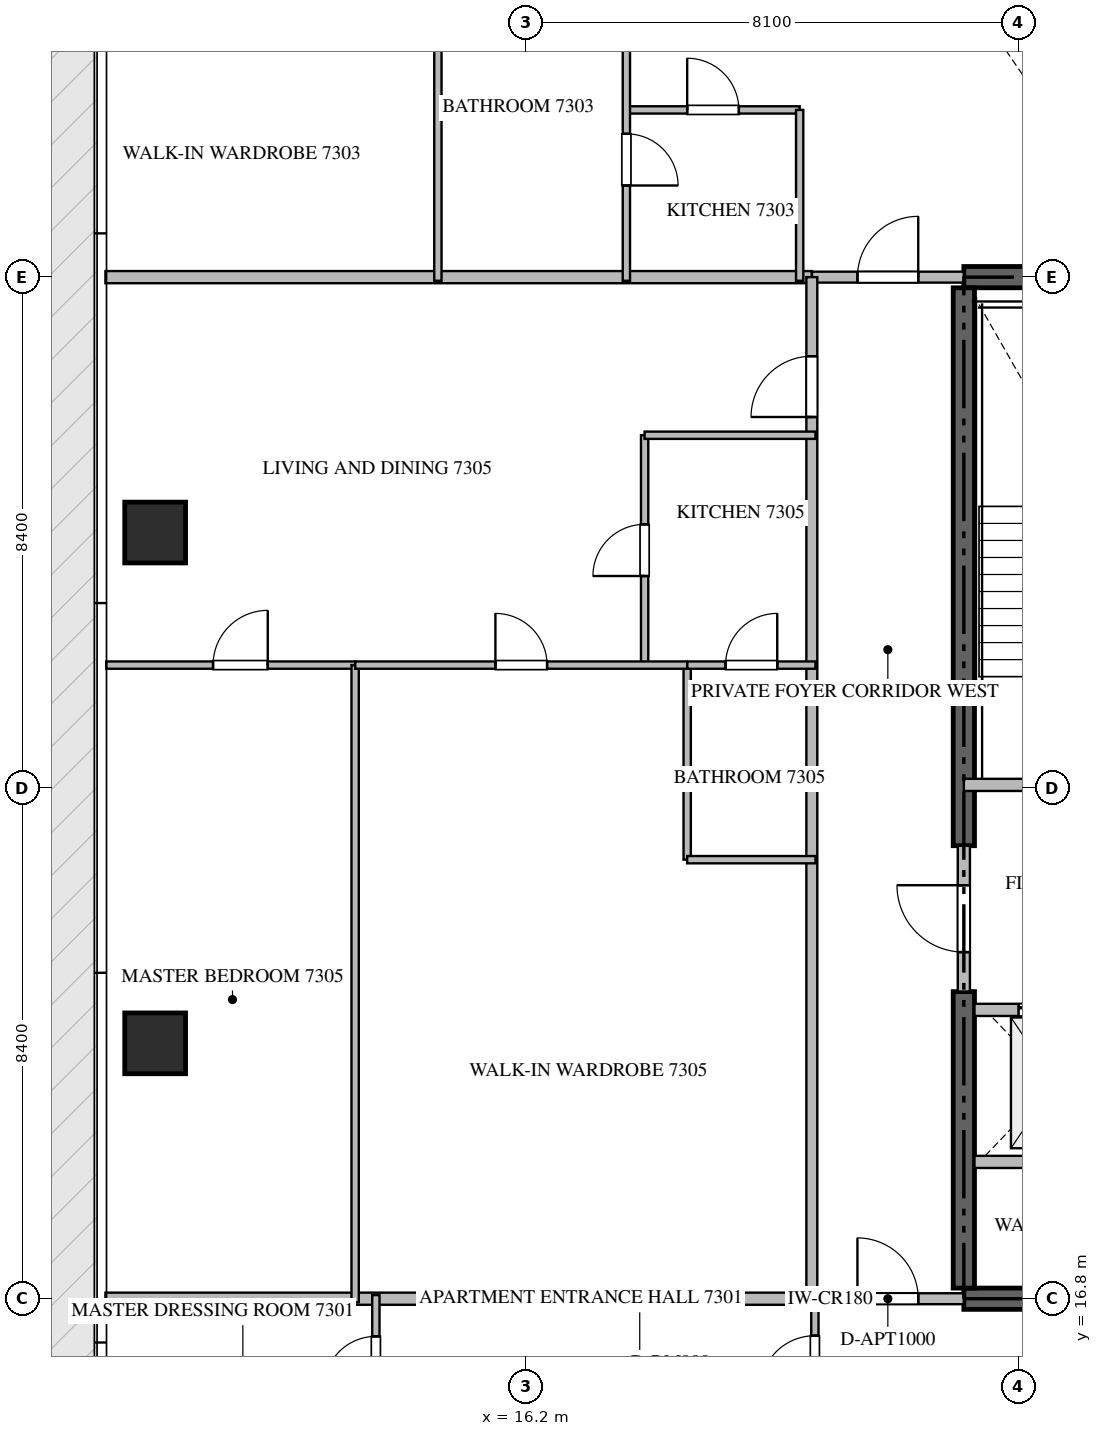
"""IFC4 building model, lengths in metres.
Left out: names, types, materials, properties, quantities, classifications, styles, units other than length and angle.
Written with IfcOpenShell. Run it as: python <this file> out.ifc"""

import sys

from ifc_helpers import new_model, si_unit, direction, frame, frame_2d, origin, origin_2d, place, context, subcontext, project, spatial, rectangle, extrude, source, transform, mapped, element, fill, save


model = new_model("IFC4")
c1 = context("Model", 3, precision=1e-05, world=origin(), true_north=direction((0.0, 1.0)))
c2 = subcontext(c1, "Body", "Model", "MODEL_VIEW")
j1 = project(units=[si_unit("LENGTHUNIT", "METRE"), si_unit("PLANEANGLEUNIT", "RADIAN")], contexts=[c1])
p1 = place(None, origin())
s1 = spatial("IfcSite", under=j1, at=p1, CompositionType="ELEMENT")
p2 = place(p1, origin())
s2 = spatial("IfcBuilding", under=s1, at=p2, CompositionType="ELEMENT")
p3 = place(p2, frame((0.0, 0.0, 293.45)))
s3 = spatial("IfcBuildingStorey", under=s2, at=p3, CompositionType="ELEMENT", Elevation=293.45)
for number, where, z_axis, x_axis in (
    (1, (23.4, 16.8, -0.26), (0.0, 0.0, 1.0), (1.0, 0.0, 0.0)),
    (2, (41.4, 33.6, -0.26), (0.0, 0.0, 1.0), (-1.0, 0.0, 0.0)),
):
    element("IfcWall", number, at=place(p3, frame(where, z_axis=z_axis, x_axis=x_axis)), inside=s3, PredefinedType="SHEAR", context=c2, shape_type="SweptSolid", body=[
        extrude(rectangle(XDim=18.0, YDim=0.35, at=frame_2d((9.0, 0.0))), origin(), (0.0, 0.0, 1.0), 4.048),
    ])
p4 = place(p3, frame((23.4, 16.975, -0.26), z_axis=(0.0, 0.0, 1.0), x_axis=(0.0, 1.0, 0.0)))
e3 = element("IfcWall", 3, at=p4, inside=s3, PredefinedType="SHEAR", context=c2, shape_type="SweptSolid", body=[
    extrude(rectangle(XDim=4.875, YDim=0.35, at=frame_2d((2.438, 0.0))), origin(), (0.0, 0.0, 1.0), 4.048),
])
p5 = place(p3, frame((23.4, 24.25, -0.26), z_axis=(0.0, 0.0, 1.0), x_axis=(0.0, 1.0, 0.0)))
e4 = element("IfcWall", 4, at=p5, inside=s3, PredefinedType="SHEAR", context=c2, shape_type="SweptSolid", body=[
    extrude(rectangle(XDim=9.175, YDim=0.35, at=frame_2d((4.587, 0.0))), origin(), (0.0, 0.0, 1.0), 4.048),
])
m1 = source(origin(), c2, "Body", "SweptSolid", [
    extrude(rectangle(XDim=1.0, YDim=1.0, at=origin_2d()), origin(), (0.0, 0.0, 1.0), 4.05),
])
for number, where, z_axis, x_axis in (
    (5, (10.1, 21.0, -0.26), (0.0, 0.0, 1.0), (1.0, 0.0, 0.0)),
    (6, (10.1, 29.4, -0.26), (0.0, 0.0, 1.0), (1.0, 0.0, 0.0)),
):
    element("IfcColumn", number, at=place(p3, frame(where, z_axis=z_axis, x_axis=x_axis)), inside=s3, PredefinedType="COLUMN", context=c2, shape_type="MappedRepresentation", body=[
        mapped(m1, transform((0.0, 0.0, 0.0), scale=1.0)),
    ])
p6 = place(p3, frame((23.4, 25.25, 0.0), z_axis=(0.0, 0.0, 1.0), x_axis=(1.0, 0.0, 0.0)))
e7 = element("IfcWall", 7, at=p6, inside=s3, PredefinedType="STANDARD", context=c2, shape_type="SweptSolid", body=[
    extrude(rectangle(XDim=4.45, YDim=0.2, at=frame_2d((2.225, 0.0))), origin(), (0.0, 0.0, 1.0), 3.79),
])
p7 = place(p6, frame((1.65, 0.0, 0.0)))
e8 = element("IfcOpeningElement", 8, at=p7, cuts=e7, PredefinedType="OPENING", context=c2, shape_type="SweptSolid", body=[
    extrude(rectangle(XDim=1.1, YDim=2.15, at=frame_2d((0.55, 1.075))), frame((0.0, 0.11, 0.0), z_axis=(0.0, -1.0, 0.0), x_axis=(1.0, 0.0, 0.0)), (0.0, 0.0, 1.0), 0.22),
])
p8 = place(p3, frame((23.575, 21.55, 0.0), z_axis=(0.0, 0.0, 1.0), x_axis=(1.0, 0.0, 0.0)))
e9 = element("IfcWall", 9, at=p8, inside=s3, PredefinedType="STANDARD", context=c2, shape_type="SweptSolid", body=[
    extrude(rectangle(XDim=2.475, YDim=0.2, at=frame_2d((1.238, 0.0))), origin(), (0.0, 0.0, 1.0), 3.79),
])
p9 = place(p8, frame((0.725, 0.0, 0.0)))
e10 = element("IfcOpeningElement", 10, at=p9, cuts=e9, PredefinedType="OPENING", context=c2, shape_type="SweptSolid", body=[
    extrude(rectangle(XDim=1.2, YDim=2.2, at=frame_2d((0.6, 1.1))), frame((0.0, 0.11, 0.0), z_axis=(0.0, -1.0, 0.0), x_axis=(1.0, 0.0, 0.0)), (0.0, 0.0, 1.0), 0.22),
])
p10 = place(p3, frame((23.575, 19.05, 0.0), z_axis=(0.0, 0.0, 1.0), x_axis=(1.0, 0.0, 0.0)))
e11 = element("IfcWall", 11, at=p10, inside=s3, PredefinedType="STANDARD", context=c2, shape_type="SweptSolid", body=[
    extrude(rectangle(XDim=2.475, YDim=0.2, at=frame_2d((1.238, 0.0))), origin(), (0.0, 0.0, 1.0), 3.79),
])
p11 = place(p3, frame((23.4, 21.852, 0.0), z_axis=(0.0, 0.0, 1.0), x_axis=(0.0, 1.0, 0.0)))
e12 = element("IfcWall", 12, at=p11, inside=s3, PredefinedType="STANDARD", context=c2, shape_type="SweptSolid", body=[
    extrude(rectangle(XDim=2.396, YDim=0.2, at=frame_2d((1.198, 0.0))), origin(), (0.0, 0.0, 1.0), 3.79),
])
p12 = place(p11, frame((0.648, 0.0, 0.0)))
e13 = element("IfcOpeningElement", 13, at=p12, cuts=e12, PredefinedType="OPENING", context=c2, shape_type="SweptSolid", body=[
    extrude(rectangle(XDim=1.1, YDim=2.15, at=frame_2d((0.55, 1.075))), frame((0.0, 0.11, 0.0), z_axis=(0.0, -1.0, 0.0), x_axis=(1.0, 0.0, 0.0)), (0.0, 0.0, 1.0), 0.22),
])
for number, where, z_axis, x_axis in (
    (14, (9.282, 16.8, 0.0), (0.0, 0.0, 1.0), (1.0, 0.0, 0.0)),
    (15, (9.282, 33.6, 0.0), (0.0, 0.0, 1.0), (1.0, 0.0, 0.0)),
):
    element("IfcWall", number, at=place(p3, frame(where, z_axis=z_axis, x_axis=x_axis)), inside=s3, PredefinedType="PARTITIONING", context=c2, shape_type="SweptSolid", body=[
        extrude(rectangle(XDim=11.618, YDim=0.2, at=frame_2d((5.809, 0.0))), origin(), (0.0, 0.0, 1.0), 3.79),
    ])
p13 = place(p3, frame((20.902, 16.8, 0.0), z_axis=(0.0, 0.0, 1.0), x_axis=(1.0, 0.0, 0.0)))
e16 = element("IfcWall", 16, at=p13, inside=s3, PredefinedType="PARTITIONING", context=c2, shape_type="SweptSolid", body=[
    extrude(rectangle(XDim=2.496, YDim=0.18, at=frame_2d((1.248, 0.0))), origin(), (0.0, 0.0, 1.0), 3.79),
])
p14 = place(p13, frame((0.748, 0.0, 0.0)))
e17 = element("IfcOpeningElement", 17, at=p14, cuts=e16, PredefinedType="OPENING", context=c2, shape_type="SweptSolid", body=[
    extrude(rectangle(XDim=1.0, YDim=2.15, at=frame_2d((0.5, 1.075))), frame((0.0, 0.1, 0.0), z_axis=(0.0, -1.0, 0.0), x_axis=(1.0, 0.0, 0.0)), (0.0, 0.0, 1.0), 0.2),
])
p15 = place(p3, frame((20.902, 33.6, 0.0), z_axis=(0.0, 0.0, 1.0), x_axis=(1.0, 0.0, 0.0)))
e18 = element("IfcWall", 18, at=p15, inside=s3, PredefinedType="PARTITIONING", context=c2, shape_type="SweptSolid", body=[
    extrude(rectangle(XDim=2.496, YDim=0.18, at=frame_2d((1.248, 0.0))), origin(), (0.0, 0.0, 1.0), 3.79),
])
p16 = place(p15, frame((0.748, 0.0, 0.0)))
e19 = element("IfcOpeningElement", 19, at=p16, cuts=e18, PredefinedType="OPENING", context=c2, shape_type="SweptSolid", body=[
    extrude(rectangle(XDim=1.0, YDim=2.15, at=frame_2d((0.5, 1.075))), frame((0.0, 0.1, 0.0), z_axis=(0.0, -1.0, 0.0), x_axis=(1.0, 0.0, 0.0)), (0.0, 0.0, 1.0), 0.2),
])
p17 = place(p3, frame((20.9, 16.8, 0.0), z_axis=(0.0, 0.0, 1.0), x_axis=(0.0, 1.0, 0.0)))
e20 = element("IfcWall", 20, at=p17, inside=s3, PredefinedType="PARTITIONING", context=c2, shape_type="SweptSolid", body=[
    extrude(rectangle(XDim=16.8, YDim=0.18, at=frame_2d((8.4, 0.0))), origin(), (0.0, 0.0, 1.0), 3.79),
])
p18 = place(p17, frame((14.5, 0.0, 0.0)))
e21 = element("IfcOpeningElement", 21, at=p18, cuts=e20, PredefinedType="OPENING", context=c2, shape_type="SweptSolid", body=[
    extrude(rectangle(XDim=1.0, YDim=2.15, at=frame_2d((0.5, 1.075))), frame((0.0, 0.1, 0.0), z_axis=(0.0, -1.0, 0.0), x_axis=(1.0, 0.0, 0.0)), (0.0, 0.0, 1.0), 0.2),
])
p19 = place(p3, frame((20.95, 14.65, 0.0), z_axis=(0.0, 0.0, 1.0), x_axis=(0.0, 1.0, 0.0)))
e22 = element("IfcWall", 22, at=p19, inside=s3, PredefinedType="PARTITIONING", context=c2, shape_type="SweptSolid", body=[
    extrude(rectangle(XDim=2.148, YDim=0.12, at=frame_2d((1.074, 0.0))), origin(), (0.0, 0.0, 1.0), 3.79),
])
p20 = place(p19, frame((0.642, 0.0, 0.0)))
e23 = element("IfcOpeningElement", 23, at=p20, cuts=e22, PredefinedType="OPENING", context=c2, shape_type="SweptSolid", body=[
    extrude(rectangle(XDim=0.9, YDim=2.1, at=frame_2d((0.45, 1.05))), frame((0.0, 0.07, 0.0), z_axis=(0.0, -1.0, 0.0), x_axis=(1.0, 0.0, 0.0)), (0.0, 0.0, 1.0), 0.14),
])
p21 = place(p3, frame((13.73, 14.652, 0.0), z_axis=(0.0, 0.0, 1.0), x_axis=(0.0, 1.0, 0.0)))
e24 = element("IfcWall", 24, at=p21, inside=s3, PredefinedType="PARTITIONING", context=c2, shape_type="SweptSolid", body=[
    extrude(rectangle(XDim=2.208, YDim=0.12, at=frame_2d((1.104, 0.0))), origin(), (0.0, 0.0, 1.0), 3.79),
])
p22 = place(p21, frame((0.679, 0.0, 0.0)))
e25 = element("IfcOpeningElement", 25, at=p22, cuts=e24, PredefinedType="OPENING", context=c2, shape_type="SweptSolid", body=[
    extrude(rectangle(XDim=0.85, YDim=2.1, at=frame_2d((0.425, 1.05))), frame((0.0, 0.07, 0.0), z_axis=(0.0, -1.0, 0.0), x_axis=(1.0, 0.0, 0.0)), (0.0, 0.0, 1.0), 0.14),
])
p23 = place(p3, frame((17.85, 36.35, 0.0), z_axis=(0.0, 0.0, 1.0), x_axis=(1.0, 0.0, 0.0)))
e26 = element("IfcWall", 26, at=p23, inside=s3, PredefinedType="PARTITIONING", context=c2, shape_type="SweptSolid", body=[
    extrude(rectangle(XDim=2.85, YDim=0.12, at=frame_2d((1.425, 0.0))), origin(), (0.0, 0.0, 1.0), 3.472),
])
p24 = place(p23, frame((1.0, 0.0, 0.0)))
e27 = element("IfcOpeningElement", 27, at=p24, cuts=e26, PredefinedType="OPENING", context=c2, shape_type="SweptSolid", body=[
    extrude(rectangle(XDim=0.85, YDim=2.1, at=frame_2d((0.425, 1.05))), frame((0.0, 0.07, 0.0), z_axis=(0.0, -1.0, 0.0), x_axis=(1.0, 0.0, 0.0)), (0.0, 0.0, 1.0), 0.14),
])
p25 = place(p3, frame((20.7, 36.35, 0.0), z_axis=(0.0, 0.0, 1.0), x_axis=(0.0, -1.0, 0.0)))
e28 = element("IfcWall", 28, at=p25, inside=s3, PredefinedType="PARTITIONING", context=c2, shape_type="SweptSolid", body=[
    extrude(rectangle(XDim=2.81, YDim=0.12, at=frame_2d((1.405, 0.0))), origin(), (0.0, 0.0, 1.0), 3.79),
])
p26 = place(p3, frame((14.75, 37.807, 0.0), z_axis=(0.0, 0.0, 1.0), x_axis=(0.0, -1.0, 0.0)))
e29 = element("IfcWall", 29, at=p26, inside=s3, PredefinedType="PARTITIONING", context=c2, shape_type="SweptSolid", body=[
    extrude(rectangle(XDim=4.267, YDim=0.12, at=frame_2d((2.133, 0.0))), origin(), (0.0, 0.0, 1.0), 3.79),
])
p27 = place(p3, frame((17.85, 37.805, 0.0), z_axis=(0.0, 0.0, 1.0), x_axis=(0.0, -1.0, 0.0)))
e30 = element("IfcWall", 30, at=p27, inside=s3, PredefinedType="PARTITIONING", context=c2, shape_type="SweptSolid", body=[
    extrude(rectangle(XDim=4.265, YDim=0.12, at=frame_2d((2.132, 0.0))), origin(), (0.0, 0.0, 1.0), 3.372),
])
p28 = place(p27, frame((1.848, 0.0, 0.0)))
e31 = element("IfcOpeningElement", 31, at=p28, cuts=e30, PredefinedType="OPENING", context=c2, shape_type="SweptSolid", body=[
    extrude(rectangle(XDim=0.85, YDim=2.1, at=frame_2d((0.425, 1.05))), frame((0.0, 0.07, 0.0), z_axis=(0.0, -1.0, 0.0), x_axis=(1.0, 0.0, 0.0)), (0.0, 0.0, 1.0), 0.14),
])
p29 = place(p3, frame((18.15, 27.22, 0.0), z_axis=(0.0, 0.0, 1.0), x_axis=(0.0, 1.0, 0.0)))
e32 = element("IfcWall", 32, at=p29, inside=s3, PredefinedType="PARTITIONING", context=c2, shape_type="SweptSolid", body=[
    extrude(rectangle(XDim=3.78, YDim=0.12, at=frame_2d((1.89, 0.0))), origin(), (0.0, 0.0, 1.0), 3.79),
])
p30 = place(p29, frame((1.465, 0.0, 0.0)))
e33 = element("IfcOpeningElement", 33, at=p30, cuts=e32, PredefinedType="OPENING", context=c2, shape_type="SweptSolid", body=[
    extrude(rectangle(XDim=0.85, YDim=2.1, at=frame_2d((0.425, 1.05))), frame((0.0, 0.07, 0.0), z_axis=(0.0, -1.0, 0.0), x_axis=(1.0, 0.0, 0.0)), (0.0, 0.0, 1.0), 0.14),
])
p31 = place(p3, frame((18.15, 31.0, 0.0), z_axis=(0.0, 0.0, 1.0), x_axis=(1.0, 0.0, 0.0)))
e34 = element("IfcWall", 34, at=p31, inside=s3, PredefinedType="PARTITIONING", context=c2, shape_type="SweptSolid", body=[
    extrude(rectangle(XDim=2.81, YDim=0.12, at=frame_2d((1.405, 0.0))), origin(), (0.0, 0.0, 1.0), 3.79),
])
p32 = place(p3, frame((9.295, 27.22, 0.0), z_axis=(0.0, 0.0, 1.0), x_axis=(1.0, 0.0, 0.0)))
e35 = element("IfcWall", 35, at=p32, inside=s3, PredefinedType="PARTITIONING", context=c2, shape_type="SweptSolid", body=[
    extrude(rectangle(XDim=4.094, YDim=0.12, at=frame_2d((2.047, 0.0))), origin(), (0.0, 0.0, 1.0), 3.79),
])
p33 = place(p32, frame((1.757, 0.0, 0.0)))
e36 = element("IfcOpeningElement", 36, at=p33, cuts=e35, PredefinedType="OPENING", context=c2, shape_type="SweptSolid", body=[
    extrude(rectangle(XDim=0.9, YDim=2.1, at=frame_2d((0.45, 1.05))), frame((0.0, 0.07, 0.0), z_axis=(0.0, -1.0, 0.0), x_axis=(1.0, 0.0, 0.0)), (0.0, 0.0, 1.0), 0.14),
])
p34 = place(p3, frame((13.389, 16.74, 0.0), z_axis=(0.0, 0.0, 1.0), x_axis=(0.0, 1.0, 0.0)))
e37 = element("IfcWall", 37, at=p34, inside=s3, PredefinedType="PARTITIONING", context=c2, shape_type="SweptSolid", body=[
    extrude(rectangle(XDim=10.48, YDim=0.12, at=frame_2d((5.24, 0.0))), origin(), (0.0, 0.0, 1.0), 3.79),
])
p35 = place(p3, frame((18.85, 24.02, 0.0), z_axis=(0.0, 0.0, 1.0), x_axis=(0.0, 1.0, 0.0)))
e38 = element("IfcWall", 38, at=p35, inside=s3, PredefinedType="PARTITIONING", context=c2, shape_type="SweptSolid", body=[
    extrude(rectangle(XDim=3.2, YDim=0.12, at=frame_2d((1.6, 0.0))), origin(), (0.0, 0.0, 1.0), 3.79),
])
p36 = place(p3, frame((18.85, 24.02, 0.0), z_axis=(0.0, 0.0, 1.0), x_axis=(1.0, 0.0, 0.0)))
e39 = element("IfcWall", 39, at=p36, inside=s3, PredefinedType="PARTITIONING", context=c2, shape_type="SweptSolid", body=[
    extrude(rectangle(XDim=2.11, YDim=0.12, at=frame_2d((1.055, 0.0))), origin(), (0.0, 0.0, 1.0), 3.79),
])
p37 = place(p3, frame((13.391, 27.22, 0.0), z_axis=(0.0, 0.0, 1.0), x_axis=(1.0, 0.0, 0.0)))
e40 = element("IfcWall", 40, at=p37, inside=s3, PredefinedType="PARTITIONING", context=c2, shape_type="SweptSolid", body=[
    extrude(rectangle(XDim=5.459, YDim=0.12, at=frame_2d((2.729, 0.0))), origin(), (0.0, 0.0, 1.0), 3.79),
])
p38 = place(p37, frame((2.305, 0.0, 0.0)))
e41 = element("IfcOpeningElement", 41, at=p38, cuts=e40, PredefinedType="OPENING", context=c2, shape_type="SweptSolid", body=[
    extrude(rectangle(XDim=0.85, YDim=2.1, at=frame_2d((0.425, 1.05))), frame((0.0, 0.07, 0.0), z_axis=(0.0, -1.0, 0.0), x_axis=(1.0, 0.0, 0.0)), (0.0, 0.0, 1.0), 0.14),
])
p39 = place(p3, frame((18.852, 27.22, 0.0), z_axis=(0.0, 0.0, 1.0), x_axis=(1.0, 0.0, 0.0)))
e42 = element("IfcWall", 42, at=p39, inside=s3, PredefinedType="PARTITIONING", context=c2, shape_type="SweptSolid", body=[
    extrude(rectangle(XDim=2.108, YDim=0.12, at=frame_2d((1.054, 0.0))), origin(), (0.0, 0.0, 1.0), 3.79),
])
p40 = place(p39, frame((0.629, 0.0, 0.0)))
e43 = element("IfcOpeningElement", 43, at=p40, cuts=e42, PredefinedType="OPENING", context=c2, shape_type="SweptSolid", body=[
    extrude(rectangle(XDim=0.85, YDim=2.1, at=frame_2d((0.425, 1.05))), frame((0.0, 0.07, 0.0), z_axis=(0.0, -1.0, 0.0), x_axis=(1.0, 0.0, 0.0)), (0.0, 0.0, 1.0), 0.14),
])
m2 = source(origin(), c2, "Body", "SweptSolid", [
    extrude(rectangle(XDim=1.2, YDim=2.2, at=frame_2d((0.6, 1.1))), frame((0.0, 0.025, 0.0), z_axis=(0.0, -1.0, 0.0), x_axis=(1.0, 0.0, 0.0)), (0.0, 0.0, 1.0), 0.05),
])
p41 = place(p9, origin())
e44 = element("IfcDoor", 44, at=p41, inside=s3, OperationType="DOUBLE_DOOR_SLIDING", PredefinedType="DOOR", context=c2, shape_type="MappedRepresentation", body=[
    mapped(m2, transform((0.0, 0.0, 0.0), scale=1.0)),
])
fill(e10, e44)
m3 = source(origin(), c2, "Body", "SweptSolid", [
    extrude(rectangle(XDim=1.1, YDim=2.15, at=frame_2d((0.55, 1.075))), frame((0.0, 0.025, 0.0), z_axis=(0.0, -1.0, 0.0), x_axis=(1.0, 0.0, 0.0)), (0.0, 0.0, 1.0), 0.05),
])
p42 = place(p12, origin())
e45 = element("IfcDoor", 45, at=p42, inside=s3, OperationType="SINGLE_SWING_RIGHT", PredefinedType="DOOR", context=c2, shape_type="MappedRepresentation", body=[
    mapped(m3, transform((0.0, 0.0, 0.0), scale=1.0)),
])
fill(e13, e45)
m4 = source(origin(), c2, "Body", "SweptSolid", [
    extrude(rectangle(XDim=1.0, YDim=2.15, at=frame_2d((0.5, 1.075))), frame((0.0, 0.025, 0.0), z_axis=(0.0, -1.0, 0.0), x_axis=(1.0, 0.0, 0.0)), (0.0, 0.0, 1.0), 0.05),
])
p43 = place(p14, origin())
e46 = element("IfcDoor", 46, at=p43, inside=s3, OperationType="SINGLE_SWING_LEFT", PredefinedType="DOOR", context=c2, shape_type="MappedRepresentation", body=[
    mapped(m4, transform((0.0, 0.0, 0.0), scale=1.0)),
])
fill(e17, e46)
p44 = place(p16, origin())
e47 = element("IfcDoor", 47, at=p44, inside=s3, OperationType="SINGLE_SWING_RIGHT", PredefinedType="DOOR", context=c2, shape_type="MappedRepresentation", body=[
    mapped(m4, transform((0.0, 0.0, 0.0), scale=1.0)),
])
fill(e19, e47)
p45 = place(p18, origin())
e48 = element("IfcDoor", 48, at=p45, inside=s3, OperationType="SINGLE_SWING_LEFT", PredefinedType="DOOR", context=c2, shape_type="MappedRepresentation", body=[
    mapped(m4, transform((0.0, 0.0, 0.0), scale=1.0)),
])
fill(e21, e48)
m5 = source(origin(), c2, "Body", "SweptSolid", [
    extrude(rectangle(XDim=0.9, YDim=2.1, at=frame_2d((0.45, 1.05))), frame((0.0, 0.025, 0.0), z_axis=(0.0, -1.0, 0.0), x_axis=(1.0, 0.0, 0.0)), (0.0, 0.0, 1.0), 0.05),
])
p46 = place(p20, origin())
e49 = element("IfcDoor", 49, at=p46, inside=s3, OperationType="SINGLE_SWING_LEFT", PredefinedType="DOOR", context=c2, shape_type="MappedRepresentation", body=[
    mapped(m5, transform((0.0, 0.0, 0.0), scale=1.0)),
])
fill(e23, e49)
m6 = source(origin(), c2, "Body", "SweptSolid", [
    extrude(rectangle(XDim=0.85, YDim=2.1, at=frame_2d((0.425, 1.05))), frame((0.0, 0.025, 0.0), z_axis=(0.0, -1.0, 0.0), x_axis=(1.0, 0.0, 0.0)), (0.0, 0.0, 1.0), 0.05),
])
p47 = place(p22, origin())
e50 = element("IfcDoor", 50, at=p47, inside=s3, OperationType="SINGLE_SWING_LEFT", PredefinedType="DOOR", context=c2, shape_type="MappedRepresentation", body=[
    mapped(m6, transform((0.0, 0.0, 0.0), scale=1.0)),
])
fill(e25, e50)
p48 = place(p24, origin())
e51 = element("IfcDoor", 51, at=p48, inside=s3, OperationType="SINGLE_SWING_LEFT", PredefinedType="DOOR", context=c2, shape_type="MappedRepresentation", body=[
    mapped(m6, transform((0.0, 0.0, 0.0), scale=1.0)),
])
fill(e27, e51)
p49 = place(p28, origin())
e52 = element("IfcDoor", 52, at=p49, inside=s3, OperationType="SINGLE_SWING_RIGHT", PredefinedType="DOOR", context=c2, shape_type="MappedRepresentation", body=[
    mapped(m6, transform((0.0, 0.0, 0.0), scale=1.0)),
])
fill(e31, e52)
p50 = place(p30, origin())
e53 = element("IfcDoor", 53, at=p50, inside=s3, OperationType="SINGLE_SWING_LEFT", PredefinedType="DOOR", context=c2, shape_type="MappedRepresentation", body=[
    mapped(m6, transform((0.0, 0.0, 0.0), scale=1.0)),
])
fill(e33, e53)
p51 = place(p33, origin())
e54 = element("IfcDoor", 54, at=p51, inside=s3, OperationType="SINGLE_SWING_RIGHT", PredefinedType="DOOR", context=c2, shape_type="MappedRepresentation", body=[
    mapped(m5, transform((0.0, 0.0, 0.0), scale=1.0)),
])
fill(e36, e54)
p52 = place(p38, origin())
e55 = element("IfcDoor", 55, at=p52, inside=s3, OperationType="SINGLE_SWING_LEFT", PredefinedType="DOOR", context=c2, shape_type="MappedRepresentation", body=[
    mapped(m6, transform((0.0, 0.0, 0.0), scale=1.0)),
])
fill(e41, e55)
p53 = place(p40, origin())
e56 = element("IfcDoor", 56, at=p53, inside=s3, OperationType="SINGLE_SWING_RIGHT", PredefinedType="DOOR", context=c2, shape_type="MappedRepresentation", body=[
    mapped(m6, transform((0.0, 0.0, 0.0), scale=1.0)),
])
fill(e43, e56)
save(model, sys.argv[1])
